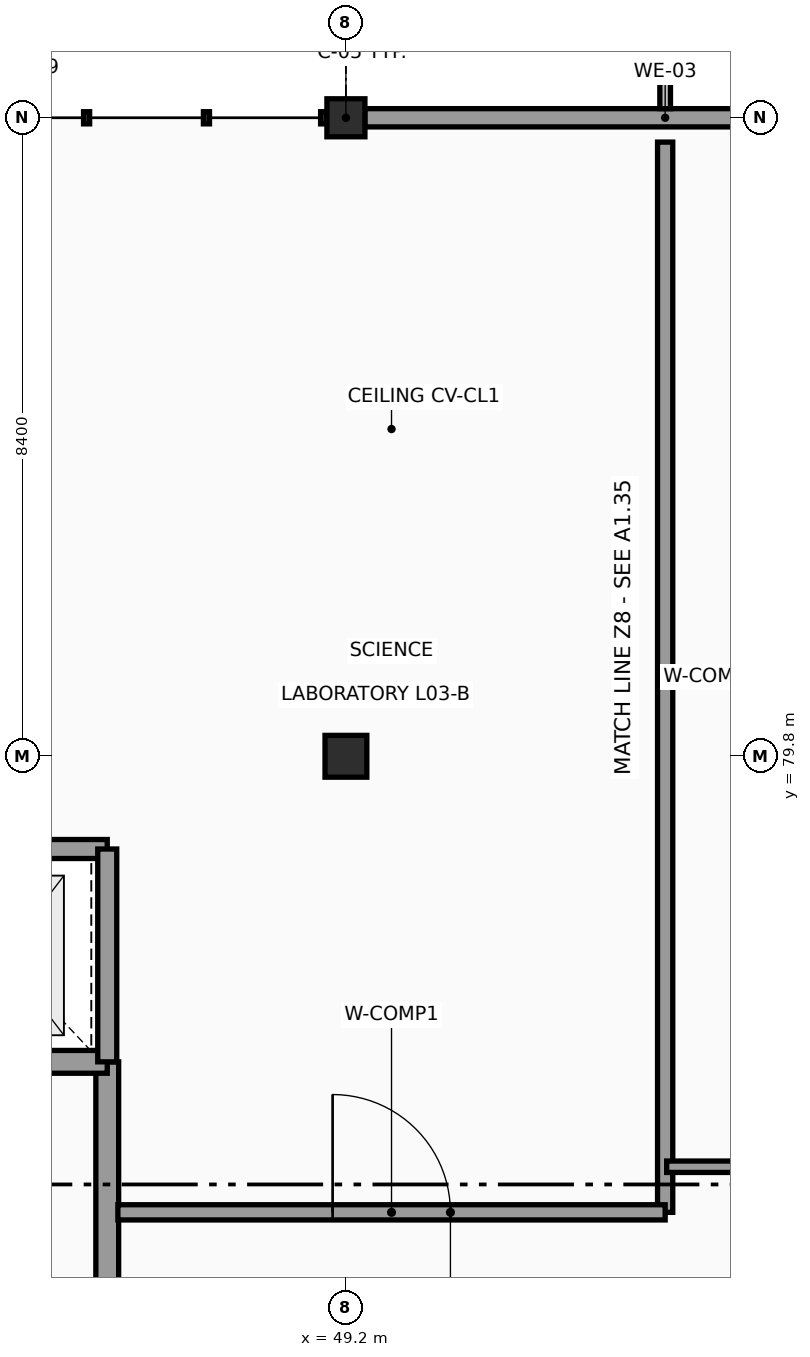
"""IFC4 building model, lengths in metres.
Left out: names, types, materials, properties, quantities, classifications, styles, units other than length and angle.
Written with IfcOpenShell. Run it as: python <this file> out.ifc"""

import sys

from ifc_helpers import new_model, si_unit, direction, frame, frame_2d, origin, origin_2d, place, context, subcontext, project, spatial, rectangle, extrude, element, fill, save


model = new_model("IFC4")
c1 = context("Model", 3, precision=1e-05, world=origin(), true_north=direction((0.0, 1.0)))
c2 = subcontext(c1, "Body", "Model", "MODEL_VIEW")
j1 = project(units=[si_unit("LENGTHUNIT", "METRE"), si_unit("PLANEANGLEUNIT", "RADIAN")], contexts=[c1])
p1 = place(None, origin())
s1 = spatial("IfcSite", under=j1, at=p1, CompositionType="ELEMENT")
p2 = place(p1, origin())
s2 = spatial("IfcBuilding", under=s1, at=p2, CompositionType="ELEMENT")
p3 = place(p2, frame((0.0, 0.0, 11.4)))
s3 = spatial("IfcBuildingStorey", under=s2, at=p3, CompositionType="ELEMENT", Elevation=11.4)
p4 = place(p3, frame((49.2, 79.8, 0.0), z_axis=(0.0, 0.0, 1.0), x_axis=(1.0, 0.0, 0.0)))
e1 = element("IfcColumn", 1, at=p4, inside=s3, PredefinedType="COLUMN", context=c2, shape_type="SweptSolid", body=[
    extrude(rectangle(XDim=0.55, YDim=0.55, at=origin_2d()), origin(), (0.0, 0.0, 1.0), 3.6),
])
p5 = place(p3, frame((49.2, 88.2, 0.0), z_axis=(0.0, 0.0, 1.0), x_axis=(1.0, 0.0, 0.0)))
e2 = element("IfcColumn", 2, at=p5, inside=s3, PredefinedType="COLUMN", context=c2, shape_type="SweptSolid", body=[
    extrude(rectangle(XDim=0.5, YDim=0.5, at=origin_2d()), origin(), (0.0, 0.0, 1.0), 3.34),
])
p6 = place(p3, frame((49.448, 88.2, 0.0), z_axis=(0.0, 0.0, 1.0), x_axis=(1.0, 0.0, 0.0)))
e3 = element("IfcWall", 3, at=p6, inside=s3, PredefinedType="SOLIDWALL", context=c2, shape_type="SweptSolid", body=[
    extrude(rectangle(XDim=7.904, YDim=0.24, at=frame_2d((3.952, 0.0))), origin(), (0.0, 0.0, 1.0), 2.58),
])
p7 = place(p3, frame((46.06, 71.54, 0.0), z_axis=(0.0, 0.0, 1.0), x_axis=(0.0, 1.0, 0.0)))
e4 = element("IfcWall", 4, at=p7, inside=s3, PredefinedType="SHEAR", context=c2, shape_type="SweptSolid", body=[
    extrude(rectangle(XDim=4.24, YDim=0.3, at=frame_2d((2.12, 0.0))), origin(), (0.0, 0.0, 1.0), 3.6),
])
p8 = place(p3, frame((46.06, 75.78, 0.0), z_axis=(0.0, 0.0, 1.0), x_axis=(-1.0, 0.0, 0.0)))
e5 = element("IfcWall", 5, at=p8, inside=s3, PredefinedType="SHEAR", context=c2, shape_type="SweptSolid", body=[
    extrude(rectangle(XDim=8.12, YDim=0.3, at=frame_2d((4.06, 0.0))), origin(), (0.0, 0.0, 1.0), 3.6),
])
p9 = place(p8, frame((6.27, 0.0, 0.0)))
e6 = element("IfcOpeningElement", 6, at=p9, cuts=e5, PredefinedType="OPENING", context=c2, shape_type="SweptSolid", body=[
    extrude(rectangle(XDim=1.35, YDim=2.15, at=frame_2d((0.675, 1.075))), frame((0.0, 0.16, 0.0), z_axis=(0.0, -1.0, 0.0), x_axis=(1.0, 0.0, 0.0)), (0.0, 0.0, 1.0), 0.32),
])
p10 = place(p3, frame((46.06, 78.58, 0.0), z_axis=(0.0, 0.0, 1.0), x_axis=(-1.0, 0.0, 0.0)))
e7 = element("IfcWall", 7, at=p10, inside=s3, PredefinedType="SHEAR", context=c2, shape_type="SweptSolid", body=[
    extrude(rectangle(XDim=2.74, YDim=0.25, at=frame_2d((1.37, 0.0))), origin(), (0.0, 0.0, 1.0), 3.6),
])
p11 = place(p3, frame((46.06, 75.78, 0.0), z_axis=(0.0, 0.0, 1.0), x_axis=(0.0, 1.0, 0.0)))
e8 = element("IfcWall", 8, at=p11, inside=s3, PredefinedType="SHEAR", context=c2, shape_type="SweptSolid", body=[
    extrude(rectangle(XDim=2.8, YDim=0.25, at=frame_2d((1.4, 0.0))), origin(), (0.0, 0.0, 1.0), 3.6),
])
p12 = place(p3, frame((53.4, 87.88, 0.0), z_axis=(0.0, 0.0, 1.0), x_axis=(0.0, -1.0, 0.0)))
e9 = element("IfcWall", 9, at=p12, inside=s3, PredefinedType="PARTITIONING", context=c2, shape_type="SweptSolid", body=[
    extrude(rectangle(XDim=14.08, YDim=0.2, at=frame_2d((7.04, 0.0))), origin(), (0.0, 0.0, 1.0), 2.59),
])
p13 = place(p3, frame((53.4, 73.8, 0.0), z_axis=(0.0, 0.0, 1.0), x_axis=(-1.0, 0.0, 0.0)))
e10 = element("IfcWall", 10, at=p13, inside=s3, PredefinedType="PARTITIONING", context=c2, shape_type="SweptSolid", body=[
    extrude(rectangle(XDim=7.2, YDim=0.2, at=frame_2d((3.6, 0.0))), origin(), (0.0, 0.0, 1.0), 2.98),
])
p14 = place(p13, frame((2.825, 0.0, 0.0)))
e11 = element("IfcOpeningElement", 11, at=p14, cuts=e10, PredefinedType="OPENING", context=c2, shape_type="SweptSolid", body=[
    extrude(rectangle(XDim=1.55, YDim=2.2, at=frame_2d((0.775, 1.1))), frame((0.0, 0.11, 0.0), z_axis=(0.0, -1.0, 0.0), x_axis=(1.0, 0.0, 0.0)), (0.0, 0.0, 1.0), 0.22),
])
p15 = place(p3, frame((66.0, 74.4, 0.0), z_axis=(0.0, 0.0, 1.0), x_axis=(-1.0, 0.0, 0.0)))
e12 = element("IfcWall", 12, at=p15, inside=s3, PredefinedType="PARTITIONING", context=c2, shape_type="SweptSolid", body=[
    extrude(rectangle(XDim=12.58, YDim=0.15, at=frame_2d((6.29, 0.0))), origin(), (0.0, 0.0, 1.0), 2.69),
])
p16 = place(p14, origin())
e13 = element("IfcDoor", 13, at=p16, inside=s3, OperationType="DOUBLE_DOOR_SINGLE_SWING", PredefinedType="DOOR", context=c2, shape_type="SweptSolid", body=[
    extrude(rectangle(XDim=1.55, YDim=2.2, at=frame_2d((0.775, 1.1))), frame((0.0, 0.025, 0.0), z_axis=(0.0, -1.0, 0.0), x_axis=(1.0, 0.0, 0.0)), (0.0, 0.0, 1.0), 0.05),
])
fill(e11, e13)
save(model, sys.argv[1])
